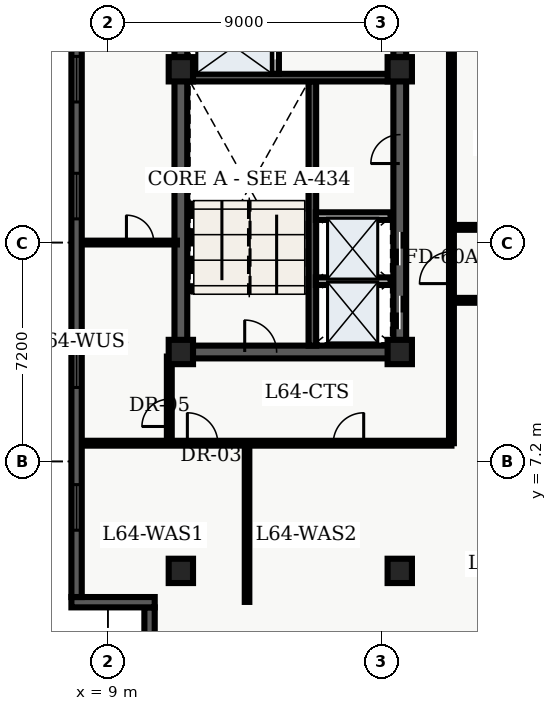
"""IFC4 building model, lengths in metres.
Left out: names, types, materials, properties, quantities, classifications, styles, units other than length and angle.
Written with IfcOpenShell. Run it as: python <this file> out.ifc"""

import sys

from ifc_helpers import new_model, entity, si_unit, converted_unit, direction, frame, origin_with_axes, origin_2d_with_axis, place, context, subcontext, project, spatial, polyline, rectangle, outline, extrude, element, fill, save


model = new_model("IFC4")
c1 = context("Model", 3, precision=1e-05, world=origin_with_axes(), true_north=direction((0.0, 1.0)))
c2 = subcontext(c1, "Body", "Model", "MODEL_VIEW")
j1 = project(units=[si_unit("LENGTHUNIT", "METRE"), converted_unit("PLANEANGLEUNIT", "DEGREE", entity("IfcPlaneAngleMeasure", 0.017), si_unit("PLANEANGLEUNIT", "RADIAN"), dimensions=[0, 0, 0, 0, 0, 0, 0])], contexts=[c1])
p1 = place(None, origin_with_axes())
s1 = spatial("IfcSite", under=j1, at=p1, CompositionType="ELEMENT")
p2 = place(p1, origin_with_axes())
s2 = spatial("IfcBuilding", under=s1, at=p2, CompositionType="ELEMENT")
p3 = place(p2, frame((0.0, 0.0, 260.7), z_axis=(0.0, 0.0, 1.0), x_axis=(1.0, 0.0, 0.0)))
s3 = spatial("IfcBuildingStorey", under=s2, at=p3, CompositionType="ELEMENT", Elevation=260.7)
p4 = place(p3, frame((11.4, 10.8, 0.0), z_axis=(0.0, 0.0, 1.0), x_axis=(0.0, 1.0, 0.0)))
e1 = element("IfcWall", 1, at=p4, inside=s3, PredefinedType="SHEAR", context=c2, shape_type="SweptSolid", body=[
    extrude(outline(polyline([(0.0, -0.21), (27.0, -0.21), (27.0, 0.21), (0.0, 0.21), (0.0, -0.21)])), origin_with_axes(), (0.0, 0.0, 1.0), 3.66),
])
p5 = place(p3, frame((11.4, 10.8, 0.0), z_axis=(0.0, 0.0, 1.0), x_axis=(1.0, 0.0, 0.0)))
e2 = element("IfcWall", 2, at=p5, inside=s3, PredefinedType="SHEAR", context=c2, shape_type="SweptSolid", body=[
    extrude(outline(polyline([(0.0, -0.21), (7.2, -0.21), (7.2, 0.21), (0.0, 0.21), (0.0, -0.21)])), origin_with_axes(), (0.0, 0.0, 1.0), 3.66),
])
p6 = place(p5, frame((2.625, 0.0, 0.0), z_axis=(0.0, 0.0, 1.0), x_axis=(1.0, 0.0, 0.0)))
e3 = element("IfcOpeningElement", 3, at=p6, cuts=e2, PredefinedType="OPENING", context=c2, shape_type="SweptSolid", body=[
    extrude(rectangle(XDim=1.05, YDim=0.44, at=origin_2d_with_axis()), origin_with_axes(), (0.0, 0.0, 1.0), 2.15),
])
p7 = place(p3, frame((18.6, 10.8, 0.0), z_axis=(0.0, 0.0, 1.0), x_axis=(0.0, 1.0, 0.0)))
e4 = element("IfcWall", 4, at=p7, inside=s3, PredefinedType="SHEAR", context=c2, shape_type="SweptSolid", body=[
    extrude(outline(polyline([(0.0, -0.21), (13.5, -0.21), (13.5, 0.21), (0.0, 0.21), (0.0, -0.21)])), origin_with_axes(), (0.0, 0.0, 1.0), 3.66),
])
p8 = place(p7, frame((1.3, 0.0, 0.0), z_axis=(0.0, 0.0, 1.0), x_axis=(1.0, 0.0, 0.0)))
e5 = element("IfcOpeningElement", 5, at=p8, cuts=e4, PredefinedType="OPENING", context=c2, shape_type="SweptSolid", body=[
    extrude(rectangle(XDim=1.1, YDim=0.44, at=origin_2d_with_axis()), origin_with_axes(), (0.0, 0.0, 1.0), 2.15),
])
p9 = place(p7, frame((3.4, 0.0, 0.0), z_axis=(0.0, 0.0, 1.0), x_axis=(1.0, 0.0, 0.0)))
e6 = element("IfcOpeningElement", 6, at=p9, cuts=e4, PredefinedType="OPENING", context=c2, shape_type="SweptSolid", body=[
    extrude(rectangle(XDim=1.1, YDim=0.44, at=origin_2d_with_axis()), origin_with_axes(), (0.0, 0.0, 1.0), 2.15),
])
p10 = place(p7, frame((11.125, 0.0, 0.0), z_axis=(0.0, 0.0, 1.0), x_axis=(1.0, 0.0, 0.0)))
e7 = element("IfcOpeningElement", 7, at=p10, cuts=e4, PredefinedType="OPENING", context=c2, shape_type="SweptSolid", body=[
    extrude(rectangle(XDim=1.05, YDim=0.44, at=origin_2d_with_axis()), origin_with_axes(), (0.0, 0.0, 1.0), 2.15),
])
p11 = place(p7, frame((6.675, 0.0, 0.0), z_axis=(0.0, 0.0, 1.0), x_axis=(1.0, 0.0, 0.0)))
e8 = element("IfcOpeningElement", 8, at=p11, cuts=e4, PredefinedType="OPENING", context=c2, shape_type="SweptSolid", body=[
    extrude(rectangle(XDim=0.95, YDim=0.44, at=origin_2d_with_axis()), origin_with_axes(), (0.0, 0.0, 1.0), 2.15),
])
p12 = place(p3, frame((15.725, 11.01, 0.0), z_axis=(0.0, 0.0, 1.0), x_axis=(0.0, 1.0, 0.0)))
e9 = element("IfcWall", 9, at=p12, inside=s3, PredefinedType="SHEAR", context=c2, shape_type="SweptSolid", body=[
    extrude(outline(polyline([(0.0, -0.125), (8.69, -0.125), (8.69, 0.125), (0.0, 0.125), (0.0, -0.125)])), origin_with_axes(), (0.0, 0.0, 1.0), 3.66),
])
p13 = place(p3, frame((11.61, 19.825, 0.0), z_axis=(0.0, 0.0, 1.0), x_axis=(1.0, 0.0, 0.0)))
e10 = element("IfcWall", 10, at=p13, inside=s3, PredefinedType="SHEAR", context=c2, shape_type="SweptSolid", body=[
    extrude(outline(polyline([(0.0, -0.125), (6.78, -0.125), (6.78, 0.125), (0.0, 0.125), (0.0, -0.125)])), origin_with_axes(), (0.0, 0.0, 1.0), 3.66),
])
p14 = place(p3, frame((14.5, 19.95, 0.0), z_axis=(0.0, 0.0, 1.0), x_axis=(0.0, 1.0, 0.0)))
e11 = element("IfcWall", 11, at=p14, inside=s3, PredefinedType="SOLIDWALL", context=c2, shape_type="SweptSolid", body=[
    extrude(outline(polyline([(0.0, -0.125), (6.25, -0.125), (6.25, 0.125), (0.0, 0.125), (0.0, -0.125)])), origin_with_axes(), (0.0, 0.0, 1.0), 2.7),
])
p15 = place(p14, frame((1.025, 0.0, 0.0), z_axis=(0.0, 0.0, 1.0), x_axis=(1.0, 0.0, 0.0)))
e12 = element("IfcOpeningElement", 12, at=p15, cuts=e11, PredefinedType="OPENING", context=c2, shape_type="SweptSolid", body=[
    extrude(rectangle(XDim=1.1, YDim=0.27, at=origin_2d_with_axis()), origin_with_axes(), (0.0, 0.0, 1.0), 2.15),
])
p16 = place(p14, frame((2.975, 0.0, 0.0), z_axis=(0.0, 0.0, 1.0), x_axis=(1.0, 0.0, 0.0)))
e13 = element("IfcOpeningElement", 13, at=p16, cuts=e11, PredefinedType="OPENING", context=c2, shape_type="SweptSolid", body=[
    extrude(rectangle(XDim=1.1, YDim=0.27, at=origin_2d_with_axis()), origin_with_axes(), (0.0, 0.0, 1.0), 2.15),
])
p17 = place(p14, frame((5.425, 0.0, 0.0), z_axis=(0.0, 0.0, 1.0), x_axis=(1.0, 0.0, 0.0)))
e14 = element("IfcOpeningElement", 14, at=p17, cuts=e11, PredefinedType="OPENING", context=c2, shape_type="SweptSolid", body=[
    extrude(rectangle(XDim=1.2, YDim=0.27, at=origin_2d_with_axis()), origin_with_axes(), (0.0, 0.0, 1.0), 2.15),
])
for number, where, z_axis, x_axis in (
    (15, (11.4, 3.6, 0.0), (0.0, 0.0, 1.0), (1.0, 0.0, 0.0)),
    (16, (11.4, 10.8, 0.0), (0.0, 0.0, 1.0), (1.0, 0.0, 0.0)),
    (17, (11.4, 20.1, 0.0), (0.0, 0.0, 1.0), (1.0, 0.0, 0.0)),
    (18, (18.6, 3.6, 0.0), (0.0, 0.0, 1.0), (1.0, 0.0, 0.0)),
    (19, (18.6, 10.8, 0.0), (0.0, 0.0, 1.0), (1.0, 0.0, 0.0)),
    (20, (18.6, 20.1, 0.0), (0.0, 0.0, 1.0), (1.0, 0.0, 0.0)),
):
    element("IfcColumn", number, at=place(p3, frame(where, z_axis=z_axis, x_axis=x_axis)), inside=s3, PredefinedType="COLUMN", context=c2, shape_type="SweptSolid", body=[
        extrude(rectangle(XDim=0.8, YDim=0.8, at=origin_2d_with_axis()), origin_with_axes(), (0.0, 0.0, 1.0), 3.9),
    ])
for number, where, z_axis, x_axis in (
    (21, (15.84, 13.13, 0.0), (0.0, 0.0, 1.0), (1.0, 0.0, 0.0)),
    (22, (15.84, 15.27, 0.0), (0.0, 0.0, 1.0), (1.0, 0.0, 0.0)),
):
    element("IfcWall", number, at=place(p3, frame(where, z_axis=z_axis, x_axis=x_axis)), inside=s3, PredefinedType="SOLIDWALL", context=c2, shape_type="SweptSolid", body=[
        extrude(outline(polyline([(0.0, -0.125), (2.46, -0.125), (2.46, 0.125), (0.0, 0.125), (0.0, -0.125)])), origin_with_axes(), (0.0, 0.0, 1.0), 2.7),
    ])
p18 = place(p3, frame((8.135, 7.8, 0.0), z_axis=(0.0, 0.0, 1.0), x_axis=(1.0, 0.0, 0.0)))
e23 = element("IfcWall", 23, at=p18, inside=s3, PredefinedType="PARTITIONING", context=c2, shape_type="SweptSolid", body=[
    extrude(outline(polyline([(0.0, -0.08), (12.165, -0.08), (12.165, 0.08), (0.0, 0.08), (0.0, -0.08)])), origin_with_axes(), (0.0, 0.0, 1.0), 2.7),
])
p19 = place(p18, frame((3.979, 0.0, 0.0), z_axis=(0.0, 0.0, 1.0), x_axis=(1.0, 0.0, 0.0)))
e24 = element("IfcOpeningElement", 24, at=p19, cuts=e23, PredefinedType="OPENING", context=c2, shape_type="SweptSolid", body=[
    extrude(rectangle(XDim=1.0, YDim=0.18, at=origin_2d_with_axis()), origin_with_axes(), (0.0, 0.0, 1.0), 2.15),
])
p20 = place(p18, frame((8.778, 0.0, 0.0), z_axis=(0.0, 0.0, 1.0), x_axis=(1.0, 0.0, 0.0)))
e25 = element("IfcOpeningElement", 25, at=p20, cuts=e23, PredefinedType="OPENING", context=c2, shape_type="SweptSolid", body=[
    extrude(rectangle(XDim=1.0, YDim=0.18, at=origin_2d_with_axis()), origin_with_axes(), (0.0, 0.0, 1.0), 2.15),
])
p21 = place(p3, frame((20.3, 7.8, 0.0), z_axis=(0.0, 0.0, 1.0), x_axis=(0.0, 1.0, 0.0)))
e26 = element("IfcWall", 26, at=p21, inside=s3, PredefinedType="PARTITIONING", context=c2, shape_type="SweptSolid", body=[
    extrude(outline(polyline([(0.0, -0.08), (32.7, -0.08), (32.7, 0.08), (0.0, 0.08), (0.0, -0.08)])), origin_with_axes(), (0.0, 0.0, 1.0), 2.7),
])
p22 = place(p21, frame((17.825, 0.0, 0.0), z_axis=(0.0, 0.0, 1.0), x_axis=(1.0, 0.0, 0.0)))
e27 = element("IfcOpeningElement", 27, at=p22, cuts=e26, PredefinedType="OPENING", context=c2, shape_type="SweptSolid", body=[
    extrude(rectangle(XDim=1.0, YDim=0.18, at=origin_2d_with_axis()), origin_with_axes(), (0.0, 0.0, 1.0), 2.15),
])
p23 = place(p21, frame((27.345, 0.0, 0.0), z_axis=(0.0, 0.0, 1.0), x_axis=(1.0, 0.0, 0.0)))
e28 = element("IfcOpeningElement", 28, at=p23, cuts=e26, PredefinedType="OPENING", context=c2, shape_type="SweptSolid", body=[
    extrude(rectangle(XDim=1.0, YDim=0.18, at=origin_2d_with_axis()), origin_with_axes(), (0.0, 0.0, 1.0), 2.15),
])
p24 = place(p21, frame((5.775, 0.0, 0.0), z_axis=(0.0, 0.0, 1.0), x_axis=(1.0, 0.0, 0.0)))
e29 = element("IfcOpeningElement", 29, at=p24, cuts=e26, PredefinedType="OPENING", context=c2, shape_type="SweptSolid", body=[
    extrude(rectangle(XDim=1.05, YDim=0.18, at=origin_2d_with_axis()), origin_with_axes(), (0.0, 0.0, 1.0), 2.15),
])
p25 = place(p3, frame((11.02, 7.8, 0.0), z_axis=(0.0, 0.0, 1.0), x_axis=(0.0, 1.0, 0.0)))
e30 = element("IfcWall", 30, at=p25, inside=s3, PredefinedType="PARTITIONING", context=c2, shape_type="SweptSolid", body=[
    extrude(outline(polyline([(0.0, -0.08), (2.85, -0.08), (2.85, 0.08), (0.0, 0.08), (0.0, -0.08)])), origin_with_axes(), (0.0, 0.0, 1.0), 2.7),
])
p26 = place(p25, frame((1.0, 0.0, 0.0), z_axis=(0.0, 0.0, 1.0), x_axis=(1.0, 0.0, 0.0)))
e31 = element("IfcOpeningElement", 31, at=p26, cuts=e30, PredefinedType="OPENING", context=c2, shape_type="SweptSolid", body=[
    extrude(rectangle(XDim=0.9, YDim=0.18, at=origin_2d_with_axis()), origin_with_axes(), (0.0, 0.0, 1.0), 2.15),
])
p27 = place(p3, frame((8.135, 14.4, 0.0), z_axis=(0.0, 0.0, 1.0), x_axis=(1.0, 0.0, 0.0)))
e32 = element("IfcWall", 32, at=p27, inside=s3, PredefinedType="PARTITIONING", context=c2, shape_type="SweptSolid", body=[
    extrude(outline(polyline([(0.0, -0.062), (3.135, -0.062), (3.135, 0.062), (0.0, 0.062), (0.0, -0.062)])), origin_with_axes(), (0.0, 0.0, 1.0), 2.7),
])
p28 = place(p27, frame((1.925, 0.0, 0.0), z_axis=(0.0, 0.0, 1.0), x_axis=(1.0, 0.0, 0.0)))
e33 = element("IfcOpeningElement", 33, at=p28, cuts=e32, PredefinedType="OPENING", context=c2, shape_type="SweptSolid", body=[
    extrude(rectangle(XDim=0.9, YDim=0.145, at=origin_2d_with_axis()), origin_with_axes(), (0.0, 0.0, 1.0), 2.15),
])
p29 = place(p3, frame((13.577, 2.58, 0.0), z_axis=(0.0, 0.0, 1.0), x_axis=(0.0, 1.0, 0.0)))
e34 = element("IfcWall", 34, at=p29, inside=s3, PredefinedType="PARTITIONING", context=c2, shape_type="SweptSolid", body=[
    extrude(outline(polyline([(0.0, -0.075), (5.12, -0.075), (5.12, 0.075), (0.0, 0.075), (0.0, -0.075)])), origin_with_axes(), (0.0, 0.0, 1.0), 2.7),
])
p30 = place(p3, frame((20.3, 12.5, 0.0), z_axis=(0.0, 0.0, 1.0), x_axis=(1.0, 0.0, 0.0)))
e35 = element("IfcWall", 35, at=p30, inside=s3, PredefinedType="PARTITIONING", context=c2, shape_type="SweptSolid", body=[
    extrude(outline(polyline([(0.0, -0.08), (16.05, -0.08), (16.05, 0.08), (0.0, 0.08), (0.0, -0.08)])), origin_with_axes(), (0.0, 0.0, 1.0), 2.7),
])
p31 = place(p30, frame((3.662, 0.0, 0.0), z_axis=(0.0, 0.0, 1.0), x_axis=(1.0, 0.0, 0.0)))
e36 = element("IfcOpeningElement", 36, at=p31, cuts=e35, PredefinedType="OPENING", context=c2, shape_type="SweptSolid", body=[
    extrude(rectangle(XDim=1.0, YDim=0.18, at=origin_2d_with_axis()), origin_with_axes(), (0.0, 0.0, 1.0), 2.15),
])
p32 = place(p30, frame((11.557, 0.0, 0.0), z_axis=(0.0, 0.0, 1.0), x_axis=(1.0, 0.0, 0.0)))
e37 = element("IfcOpeningElement", 37, at=p32, cuts=e35, PredefinedType="OPENING", context=c2, shape_type="SweptSolid", body=[
    extrude(rectangle(XDim=1.0, YDim=0.18, at=origin_2d_with_axis()), origin_with_axes(), (0.0, 0.0, 1.0), 2.15),
])
p33 = place(p3, frame((20.3, 14.9, 0.0), z_axis=(0.0, 0.0, 1.0), x_axis=(1.0, 0.0, 0.0)))
e38 = element("IfcWall", 38, at=p33, inside=s3, PredefinedType="PARTITIONING", context=c2, shape_type="SweptSolid", body=[
    extrude(outline(polyline([(0.0, -0.08), (16.05, -0.08), (16.05, 0.08), (0.0, 0.08), (0.0, -0.08)])), origin_with_axes(), (0.0, 0.0, 1.0), 2.7),
])
p34 = place(p33, frame((3.759, 0.0, 0.0), z_axis=(0.0, 0.0, 1.0), x_axis=(1.0, 0.0, 0.0)))
e39 = element("IfcOpeningElement", 39, at=p34, cuts=e38, PredefinedType="OPENING", context=c2, shape_type="SweptSolid", body=[
    extrude(rectangle(XDim=1.0, YDim=0.18, at=origin_2d_with_axis()), origin_with_axes(), (0.0, 0.0, 1.0), 2.15),
])
p35 = place(p33, frame((11.654, 0.0, 0.0), z_axis=(0.0, 0.0, 1.0), x_axis=(1.0, 0.0, 0.0)))
e40 = element("IfcOpeningElement", 40, at=p35, cuts=e38, PredefinedType="OPENING", context=c2, shape_type="SweptSolid", body=[
    extrude(rectangle(XDim=1.0, YDim=0.18, at=origin_2d_with_axis()), origin_with_axes(), (0.0, 0.0, 1.0), 2.15),
])
p36 = place(p3, frame((10.37, 0.34, 0.0), z_axis=(0.0, 0.0, 1.0), x_axis=(0.0, 1.0, 0.0)))
e41 = element("IfcWall", 41, at=p36, inside=s3, PredefinedType="SOLIDWALL", context=c2, shape_type="SweptSolid", body=[
    extrude(outline(polyline([(0.0, -0.17), (2.06, -0.17), (2.06, 0.17), (0.0, 0.17), (0.0, -0.17)])), origin_with_axes(), (0.0, 0.0, 1.0), 3.66),
])
p37 = place(p3, frame((10.54, 2.57, 0.0), z_axis=(0.0, 0.0, 1.0), x_axis=(-1.0, 0.0, 0.0)))
e42 = element("IfcWall", 42, at=p37, inside=s3, PredefinedType="SOLIDWALL", context=c2, shape_type="SweptSolid", body=[
    extrude(outline(polyline([(0.0, -0.17), (2.74, -0.17), (2.74, 0.17), (0.0, 0.17), (0.0, -0.17)])), origin_with_axes(), (0.0, 0.0, 1.0), 3.66),
])
p38 = place(p3, frame((7.97, 2.74, 0.0), z_axis=(0.0, 0.0, 1.0), x_axis=(0.0, 1.0, 0.0)))
e43 = element("IfcWall", 43, at=p38, inside=s3, PredefinedType="SOLIDWALL", context=c2, shape_type="SweptSolid", body=[
    extrude(outline(polyline([(0.0, -0.17), (43.46, -0.17), (43.46, 0.17), (0.0, 0.17), (0.0, -0.17)])), origin_with_axes(), (0.0, 0.0, 1.0), 3.66),
])
p39 = place(p38, frame((2.948, 0.0, 0.45), z_axis=(0.0, 0.0, 1.0), x_axis=(1.0, 0.0, 0.0)))
e44 = element("IfcOpeningElement", 44, at=p39, cuts=e43, PredefinedType="OPENING", context=c2, shape_type="SweptSolid", body=[
    extrude(rectangle(XDim=1.5, YDim=0.36, at=origin_2d_with_axis()), origin_with_axes(), (0.0, 0.0, 1.0), 2.1),
])
p40 = place(p38, frame((7.643, 0.0, 0.45), z_axis=(0.0, 0.0, 1.0), x_axis=(1.0, 0.0, 0.0)))
e45 = element("IfcOpeningElement", 45, at=p40, cuts=e43, PredefinedType="OPENING", context=c2, shape_type="SweptSolid", body=[
    extrude(rectangle(XDim=1.5, YDim=0.36, at=origin_2d_with_axis()), origin_with_axes(), (0.0, 0.0, 1.0), 2.1),
])
p41 = place(p38, frame((13.189, 0.0, 0.45), z_axis=(0.0, 0.0, 1.0), x_axis=(1.0, 0.0, 0.0)))
e46 = element("IfcOpeningElement", 46, at=p41, cuts=e43, PredefinedType="OPENING", context=c2, shape_type="SweptSolid", body=[
    extrude(rectangle(XDim=1.5, YDim=0.36, at=origin_2d_with_axis()), origin_with_axes(), (0.0, 0.0, 1.0), 2.1),
])
p42 = place(p38, frame((17.034, 0.0, 0.45), z_axis=(0.0, 0.0, 1.0), x_axis=(1.0, 0.0, 0.0)))
e47 = element("IfcOpeningElement", 47, at=p42, cuts=e43, PredefinedType="OPENING", context=c2, shape_type="SweptSolid", body=[
    extrude(rectangle(XDim=1.5, YDim=0.36, at=origin_2d_with_axis()), origin_with_axes(), (0.0, 0.0, 1.0), 2.1),
])
p43 = place(p38, frame((21.73, 0.0, 0.45), z_axis=(0.0, 0.0, 1.0), x_axis=(1.0, 0.0, 0.0)))
e48 = element("IfcOpeningElement", 48, at=p43, cuts=e43, PredefinedType="OPENING", context=c2, shape_type="SweptSolid", body=[
    extrude(rectangle(XDim=1.5, YDim=0.36, at=origin_2d_with_axis()), origin_with_axes(), (0.0, 0.0, 1.0), 2.1),
])
p44 = place(p38, frame((26.426, 0.0, 0.45), z_axis=(0.0, 0.0, 1.0), x_axis=(1.0, 0.0, 0.0)))
e49 = element("IfcOpeningElement", 49, at=p44, cuts=e43, PredefinedType="OPENING", context=c2, shape_type="SweptSolid", body=[
    extrude(rectangle(XDim=1.5, YDim=0.36, at=origin_2d_with_axis()), origin_with_axes(), (0.0, 0.0, 1.0), 2.1),
])
p45 = place(p38, frame((35.817, 0.0, 0.45), z_axis=(0.0, 0.0, 1.0), x_axis=(1.0, 0.0, 0.0)))
e50 = element("IfcOpeningElement", 50, at=p45, cuts=e43, PredefinedType="OPENING", context=c2, shape_type="SweptSolid", body=[
    extrude(rectangle(XDim=1.5, YDim=0.36, at=origin_2d_with_axis()), origin_with_axes(), (0.0, 0.0, 1.0), 2.1),
])
p46 = place(p38, frame((40.512, 0.0, 0.45), z_axis=(0.0, 0.0, 1.0), x_axis=(1.0, 0.0, 0.0)))
e51 = element("IfcOpeningElement", 51, at=p46, cuts=e43, PredefinedType="OPENING", context=c2, shape_type="SweptSolid", body=[
    extrude(rectangle(XDim=1.5, YDim=0.36, at=origin_2d_with_axis()), origin_with_axes(), (0.0, 0.0, 1.0), 2.1),
])
p47 = place(p7, frame((1.3, 0.0, 0.0), z_axis=(0.0, 0.0, 1.0), x_axis=(1.0, 0.0, 0.0)))
e52 = element("IfcDoor", 52, at=p47, inside=s3, OperationType="SLIDING_TO_LEFT", PredefinedType="DOOR", context=c2, shape_type="SweptSolid", body=[
    extrude(rectangle(XDim=1.1, YDim=0.09, at=origin_2d_with_axis()), origin_with_axes(), (0.0, 0.0, 1.0), 2.15),
])
fill(e5, e52)
p48 = place(p7, frame((3.4, 0.0, 0.0), z_axis=(0.0, 0.0, 1.0), x_axis=(1.0, 0.0, 0.0)))
e53 = element("IfcDoor", 53, at=p48, inside=s3, OperationType="SLIDING_TO_RIGHT", PredefinedType="DOOR", context=c2, shape_type="SweptSolid", body=[
    extrude(rectangle(XDim=1.1, YDim=0.09, at=origin_2d_with_axis()), origin_with_axes(), (0.0, 0.0, 1.0), 2.15),
])
fill(e6, e53)
p49 = place(p14, frame((1.025, 0.0, 0.0), z_axis=(0.0, 0.0, 1.0), x_axis=(1.0, 0.0, 0.0)))
e54 = element("IfcDoor", 54, at=p49, inside=s3, OperationType="SLIDING_TO_LEFT", PredefinedType="DOOR", context=c2, shape_type="SweptSolid", body=[
    extrude(rectangle(XDim=1.1, YDim=0.09, at=origin_2d_with_axis()), origin_with_axes(), (0.0, 0.0, 1.0), 2.15),
])
fill(e12, e54)
p50 = place(p5, frame((2.625, 0.0, 0.0), z_axis=(0.0, 0.0, 1.0), x_axis=(1.0, 0.0, 0.0)))
e55 = element("IfcDoor", 55, at=p50, inside=s3, OperationType="SINGLE_SWING_LEFT", PredefinedType="DOOR", context=c2, shape_type="SweptSolid", body=[
    extrude(rectangle(XDim=1.05, YDim=0.09, at=origin_2d_with_axis()), origin_with_axes(), (0.0, 0.0, 1.0), 2.15),
])
fill(e3, e55)
p51 = place(p7, frame((6.675, 0.0, 0.0), z_axis=(0.0, 0.0, 1.0), x_axis=(1.0, 0.0, 0.0)))
e56 = element("IfcDoor", 56, at=p51, inside=s3, OperationType="SINGLE_SWING_LEFT", PredefinedType="DOOR", context=c2, shape_type="SweptSolid", body=[
    extrude(rectangle(XDim=0.95, YDim=0.09, at=origin_2d_with_axis()), origin_with_axes(), (0.0, 0.0, 1.0), 2.15),
])
fill(e8, e56)
p52 = place(p25, frame((1.0, 0.0, 0.0), z_axis=(0.0, 0.0, 1.0), x_axis=(1.0, 0.0, 0.0)))
e57 = element("IfcDoor", 57, at=p52, inside=s3, OperationType="SINGLE_SWING_LEFT", PredefinedType="DOOR", context=c2, shape_type="SweptSolid", body=[
    extrude(rectangle(XDim=0.9, YDim=0.09, at=origin_2d_with_axis()), origin_with_axes(), (0.0, 0.0, 1.0), 2.15),
])
fill(e31, e57)
p53 = place(p27, frame((1.925, 0.0, 0.0), z_axis=(0.0, 0.0, 1.0), x_axis=(1.0, 0.0, 0.0)))
e58 = element("IfcDoor", 58, at=p53, inside=s3, OperationType="SINGLE_SWING_LEFT", PredefinedType="DOOR", context=c2, shape_type="SweptSolid", body=[
    extrude(rectangle(XDim=0.9, YDim=0.075, at=origin_2d_with_axis()), origin_with_axes(), (0.0, 0.0, 1.0), 2.15),
])
fill(e33, e58)
p54 = place(p18, frame((3.979, 0.0, 0.0), z_axis=(0.0, 0.0, 1.0), x_axis=(1.0, 0.0, 0.0)))
e59 = element("IfcDoor", 59, at=p54, inside=s3, OperationType="SINGLE_SWING_LEFT", PredefinedType="DOOR", context=c2, shape_type="SweptSolid", body=[
    extrude(rectangle(XDim=1.0, YDim=0.09, at=origin_2d_with_axis()), origin_with_axes(), (0.0, 0.0, 1.0), 2.15),
])
fill(e24, e59)
p55 = place(p18, frame((8.778, 0.0, 0.0), z_axis=(0.0, 0.0, 1.0), x_axis=(1.0, 0.0, 0.0)))
e60 = element("IfcDoor", 60, at=p55, inside=s3, OperationType="SINGLE_SWING_RIGHT", PredefinedType="DOOR", context=c2, shape_type="SweptSolid", body=[
    extrude(rectangle(XDim=1.0, YDim=0.09, at=origin_2d_with_axis()), origin_with_axes(), (0.0, 0.0, 1.0), 2.15),
])
fill(e25, e60)
p56 = place(p21, frame((5.775, 0.0, 0.0), z_axis=(0.0, 0.0, 1.0), x_axis=(1.0, 0.0, 0.0)))
e61 = element("IfcDoor", 61, at=p56, inside=s3, OperationType="SINGLE_SWING_LEFT", PredefinedType="DOOR", context=c2, shape_type="SweptSolid", body=[
    extrude(rectangle(XDim=1.05, YDim=0.09, at=origin_2d_with_axis()), origin_with_axes(), (0.0, 0.0, 1.0), 2.15),
])
fill(e29, e61)
p57 = place(p38, frame((2.948, 0.0, 0.45), z_axis=(0.0, 0.0, 1.0), x_axis=(1.0, 0.0, 0.0)))
e62 = element("IfcWindow", 62, at=p57, inside=s3, PredefinedType="WINDOW", context=c2, shape_type="SweptSolid", body=[
    extrude(rectangle(XDim=1.5, YDim=0.09, at=origin_2d_with_axis()), origin_with_axes(), (0.0, 0.0, 1.0), 2.1),
])
fill(e44, e62)
p58 = place(p38, frame((7.643, 0.0, 0.45), z_axis=(0.0, 0.0, 1.0), x_axis=(1.0, 0.0, 0.0)))
e63 = element("IfcWindow", 63, at=p58, inside=s3, PredefinedType="WINDOW", context=c2, shape_type="SweptSolid", body=[
    extrude(rectangle(XDim=1.5, YDim=0.09, at=origin_2d_with_axis()), origin_with_axes(), (0.0, 0.0, 1.0), 2.1),
])
fill(e45, e63)
p59 = place(p38, frame((13.189, 0.0, 0.45), z_axis=(0.0, 0.0, 1.0), x_axis=(1.0, 0.0, 0.0)))
e64 = element("IfcWindow", 64, at=p59, inside=s3, PredefinedType="WINDOW", context=c2, shape_type="SweptSolid", body=[
    extrude(rectangle(XDim=1.5, YDim=0.09, at=origin_2d_with_axis()), origin_with_axes(), (0.0, 0.0, 1.0), 2.1),
])
fill(e46, e64)
p60 = place(p38, frame((17.034, 0.0, 0.45), z_axis=(0.0, 0.0, 1.0), x_axis=(1.0, 0.0, 0.0)))
e65 = element("IfcWindow", 65, at=p60, inside=s3, PredefinedType="WINDOW", context=c2, shape_type="SweptSolid", body=[
    extrude(rectangle(XDim=1.5, YDim=0.09, at=origin_2d_with_axis()), origin_with_axes(), (0.0, 0.0, 1.0), 2.1),
])
fill(e47, e65)
save(model, sys.argv[1])
